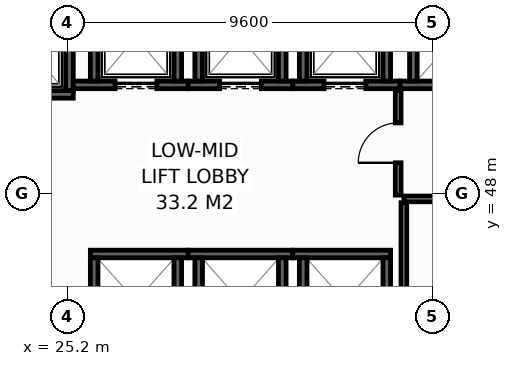
"""IFC4 building model, lengths in metres.
Left out: names, types, materials, properties, quantities, classifications, styles, units other than length and angle.
Written with IfcOpenShell. Run it as: python <this file> out.ifc"""

import sys

from ifc_helpers import new_model, si_unit, direction, frame, frame_2d, origin, place, context, subcontext, project, spatial, rectangle, extrude, element, fill, save


model = new_model("IFC4")
c1 = context("Model", 3, precision=1e-05, world=origin(), true_north=direction((0.0, 1.0)))
c2 = subcontext(c1, "Body", "Model", "MODEL_VIEW")
j1 = project(units=[si_unit("LENGTHUNIT", "METRE"), si_unit("PLANEANGLEUNIT", "RADIAN")], contexts=[c1])
p1 = place(None, origin())
s1 = spatial("IfcSite", under=j1, at=p1, CompositionType="ELEMENT")
p2 = place(p1, origin())
s2 = spatial("IfcBuilding", under=s1, at=p2, CompositionType="ELEMENT")
p3 = place(p2, frame((0.0, 0.0, 51.6)))
s3 = spatial("IfcBuildingStorey", under=s2, at=p3, CompositionType="ELEMENT", Elevation=51.6)
p4 = place(p3, frame((22.5, 50.6, 0.0), z_axis=(0.0, 0.0, 1.0), x_axis=(1.0, 0.0, 0.0)))
e1 = element("IfcWall", 1, at=p4, inside=s3, PredefinedType="SHEAR", context=c2, shape_type="SweptSolid", body=[
    extrude(rectangle(XDim=2.85, YDim=0.2, at=frame_2d((1.425, 0.0))), origin(), (0.0, 0.0, 1.0), 4.15),
])
p5 = place(p4, frame((0.925, 0.0, 0.0)))
e2 = element("IfcOpeningElement", 2, at=p5, cuts=e1, PredefinedType="OPENING", context=c2, shape_type="SweptSolid", body=[
    extrude(rectangle(XDim=1.25, YDim=2.3, at=frame_2d((0.625, 1.15))), frame((0.0, 0.11, 0.0), z_axis=(0.0, -1.0, 0.0), x_axis=(1.0, 0.0, 0.0)), (0.0, 0.0, 1.0), 0.22),
])
p6 = place(p3, frame((25.25, 50.7, 0.0), z_axis=(0.0, 0.0, 1.0), x_axis=(0.0, 1.0, 0.0)))
e3 = element("IfcWall", 3, at=p6, inside=s3, PredefinedType="SHEAR", context=c2, shape_type="SweptSolid", body=[
    extrude(rectangle(XDim=2.6, YDim=0.2, at=frame_2d((1.3, 0.0))), origin(), (0.0, 0.0, 1.0), 4.15),
])
p7 = place(p3, frame((25.35, 50.85, 0.0), z_axis=(0.0, 0.0, 1.0), x_axis=(1.0, 0.0, 0.0)))
e4 = element("IfcWall", 4, at=p7, inside=s3, PredefinedType="SHEAR", context=c2, shape_type="SweptSolid", body=[
    extrude(rectangle(XDim=3.025, YDim=0.2, at=frame_2d((1.512, 0.0))), origin(), (0.0, 0.0, 1.0), 4.15),
])
p8 = place(p7, frame((1.1, 0.0, 0.0)))
e5 = element("IfcOpeningElement", 5, at=p8, cuts=e4, PredefinedType="OPENING", context=c2, shape_type="SweptSolid", body=[
    extrude(rectangle(XDim=1.1, YDim=2.2, at=frame_2d((0.55, 1.1))), frame((0.0, 0.11, 0.0), z_axis=(0.0, -1.0, 0.0), x_axis=(1.0, 0.0, 0.0)), (0.0, 0.0, 1.0), 0.22),
])
for number, where, z_axis, x_axis in (
    (6, (25.9, 50.95, 0.0), (0.0, 0.0, 1.0), (0.0, 1.0, 0.0)),
    (7, (28.1, 50.95, 0.0), (0.0, 0.0, 1.0), (0.0, 1.0, 0.0)),
):
    element("IfcWall", number, at=place(p3, frame(where, z_axis=z_axis, x_axis=x_axis)), inside=s3, PredefinedType="SHEAR", context=c2, shape_type="SweptSolid", body=[
        extrude(rectangle(XDim=2.3, YDim=0.2, at=frame_2d((1.15, 0.0))), origin(), (0.0, 0.0, 1.0), 4.15),
    ])
p9 = place(p3, frame((28.375, 50.85, 0.0), z_axis=(0.0, 0.0, 1.0), x_axis=(1.0, 0.0, 0.0)))
e8 = element("IfcWall", 8, at=p9, inside=s3, PredefinedType="SHEAR", context=c2, shape_type="SweptSolid", body=[
    extrude(rectangle(XDim=2.75, YDim=0.2, at=frame_2d((1.375, 0.0))), origin(), (0.0, 0.0, 1.0), 4.15),
])
p10 = place(p9, frame((0.825, 0.0, 0.0)))
e9 = element("IfcOpeningElement", 9, at=p10, cuts=e8, PredefinedType="OPENING", context=c2, shape_type="SweptSolid", body=[
    extrude(rectangle(XDim=1.1, YDim=2.2, at=frame_2d((0.55, 1.1))), frame((0.0, 0.11, 0.0), z_axis=(0.0, -1.0, 0.0), x_axis=(1.0, 0.0, 0.0)), (0.0, 0.0, 1.0), 0.22),
])
for number, where, z_axis, x_axis in (
    (10, (28.65, 50.95, 0.0), (0.0, 0.0, 1.0), (0.0, 1.0, 0.0)),
    (11, (30.85, 50.95, 0.0), (0.0, 0.0, 1.0), (0.0, 1.0, 0.0)),
):
    element("IfcWall", number, at=place(p3, frame(where, z_axis=z_axis, x_axis=x_axis)), inside=s3, PredefinedType="SHEAR", context=c2, shape_type="SweptSolid", body=[
        extrude(rectangle(XDim=2.3, YDim=0.2, at=frame_2d((1.15, 0.0))), origin(), (0.0, 0.0, 1.0), 4.15),
    ])
p11 = place(p3, frame((31.125, 50.85, 0.0), z_axis=(0.0, 0.0, 1.0), x_axis=(1.0, 0.0, 0.0)))
e12 = element("IfcWall", 12, at=p11, inside=s3, PredefinedType="SHEAR", context=c2, shape_type="SweptSolid", body=[
    extrude(rectangle(XDim=2.825, YDim=0.2, at=frame_2d((1.413, 0.0))), origin(), (0.0, 0.0, 1.0), 4.15),
])
p12 = place(p11, frame((0.825, 0.0, 0.0)))
e13 = element("IfcOpeningElement", 13, at=p12, cuts=e12, PredefinedType="OPENING", context=c2, shape_type="SweptSolid", body=[
    extrude(rectangle(XDim=1.1, YDim=2.2, at=frame_2d((0.55, 1.1))), frame((0.0, 0.11, 0.0), z_axis=(0.0, -1.0, 0.0), x_axis=(1.0, 0.0, 0.0)), (0.0, 0.0, 1.0), 0.22),
])
for number, where, z_axis, x_axis in (
    (14, (31.4, 50.95, 0.0), (0.0, 0.0, 1.0), (0.0, 1.0, 0.0)),
    (15, (33.6, 50.95, 0.0), (0.0, 0.0, 1.0), (0.0, 1.0, 0.0)),
):
    element("IfcWall", number, at=place(p3, frame(where, z_axis=z_axis, x_axis=x_axis)), inside=s3, PredefinedType="SHEAR", context=c2, shape_type="SweptSolid", body=[
        extrude(rectangle(XDim=2.3, YDim=0.2, at=frame_2d((1.15, 0.0))), origin(), (0.0, 0.0, 1.0), 4.15),
    ])
p13 = place(p3, frame((25.8, 46.4, 0.0), z_axis=(0.0, 0.0, 1.0), x_axis=(1.0, 0.0, 0.0)))
e16 = element("IfcWall", 16, at=p13, inside=s3, PredefinedType="SHEAR", context=c2, shape_type="SweptSolid", body=[
    extrude(rectangle(XDim=2.575, YDim=0.2, at=frame_2d((1.288, 0.0))), origin(), (0.0, 0.0, 1.0), 4.15),
])
for number, where, z_axis, x_axis in (
    (17, (25.9, 44.0, 0.0), (0.0, 0.0, 1.0), (0.0, 1.0, 0.0)),
    (18, (28.1, 44.0, 0.0), (0.0, 0.0, 1.0), (0.0, 1.0, 0.0)),
):
    element("IfcWall", number, at=place(p3, frame(where, z_axis=z_axis, x_axis=x_axis)), inside=s3, PredefinedType="SHEAR", context=c2, shape_type="SweptSolid", body=[
        extrude(rectangle(XDim=2.3, YDim=0.2, at=frame_2d((1.15, 0.0))), origin(), (0.0, 0.0, 1.0), 4.15),
    ])
p14 = place(p3, frame((28.375, 46.4, 0.0), z_axis=(0.0, 0.0, 1.0), x_axis=(1.0, 0.0, 0.0)))
e19 = element("IfcWall", 19, at=p14, inside=s3, PredefinedType="SHEAR", context=c2, shape_type="SweptSolid", body=[
    extrude(rectangle(XDim=2.75, YDim=0.2, at=frame_2d((1.375, 0.0))), origin(), (0.0, 0.0, 1.0), 4.15),
])
for number, where, z_axis, x_axis in (
    (20, (28.65, 44.0, 0.0), (0.0, 0.0, 1.0), (0.0, 1.0, 0.0)),
    (21, (30.85, 44.0, 0.0), (0.0, 0.0, 1.0), (0.0, 1.0, 0.0)),
):
    element("IfcWall", number, at=place(p3, frame(where, z_axis=z_axis, x_axis=x_axis)), inside=s3, PredefinedType="SHEAR", context=c2, shape_type="SweptSolid", body=[
        extrude(rectangle(XDim=2.3, YDim=0.2, at=frame_2d((1.15, 0.0))), origin(), (0.0, 0.0, 1.0), 4.15),
    ])
p15 = place(p3, frame((31.125, 46.4, 0.0), z_axis=(0.0, 0.0, 1.0), x_axis=(1.0, 0.0, 0.0)))
e22 = element("IfcWall", 22, at=p15, inside=s3, PredefinedType="SHEAR", context=c2, shape_type="SweptSolid", body=[
    extrude(rectangle(XDim=2.575, YDim=0.2, at=frame_2d((1.288, 0.0))), origin(), (0.0, 0.0, 1.0), 4.15),
])
for number, where, z_axis, x_axis in (
    (23, (31.4, 44.0, 0.0), (0.0, 0.0, 1.0), (0.0, 1.0, 0.0)),
    (24, (33.6, 44.0, 0.0), (0.0, 0.0, 1.0), (0.0, 1.0, 0.0)),
):
    element("IfcWall", number, at=place(p3, frame(where, z_axis=z_axis, x_axis=x_axis)), inside=s3, PredefinedType="SHEAR", context=c2, shape_type="SweptSolid", body=[
        extrude(rectangle(XDim=2.3, YDim=0.2, at=frame_2d((1.15, 0.0))), origin(), (0.0, 0.0, 1.0), 4.15),
    ])
p16 = place(p3, frame((33.95, 50.85, 0.0), z_axis=(0.0, 0.0, 1.0), x_axis=(1.0, 0.0, 0.0)))
e25 = element("IfcWall", 25, at=p16, inside=s3, PredefinedType="SHEAR", context=c2, shape_type="SweptSolid", body=[
    extrude(rectangle(XDim=2.825, YDim=0.2, at=frame_2d((1.413, 0.0))), origin(), (0.0, 0.0, 1.0), 4.15),
])
p17 = place(p3, frame((34.3, 50.95, 0.0), z_axis=(0.0, 0.0, 1.0), x_axis=(0.0, 1.0, 0.0)))
e26 = element("IfcWall", 26, at=p17, inside=s3, PredefinedType="SHEAR", context=c2, shape_type="SweptSolid", body=[
    extrude(rectangle(XDim=2.3, YDim=0.2, at=frame_2d((1.15, 0.0))), origin(), (0.0, 0.0, 1.0), 4.15),
])
p18 = place(p3, frame((33.9, 47.95, 0.0), z_axis=(0.0, 0.0, 1.0), x_axis=(0.0, 1.0, 0.0)))
e27 = element("IfcWall", 27, at=p18, inside=s3, PredefinedType="PARTITIONING", context=c2, shape_type="SweptSolid", body=[
    extrude(rectangle(XDim=2.75, YDim=0.15, at=frame_2d((1.375, 0.0))), origin(), (0.0, 0.0, 1.0), 4.15),
])
p19 = place(p18, frame((0.85, 0.0, 0.0)))
e28 = element("IfcOpeningElement", 28, at=p19, cuts=e27, PredefinedType="OPENING", context=c2, shape_type="SweptSolid", body=[
    extrude(rectangle(XDim=1.05, YDim=2.15, at=frame_2d((0.525, 1.075))), frame((0.0, 0.085, 0.0), z_axis=(0.0, -1.0, 0.0), x_axis=(1.0, 0.0, 0.0)), (0.0, 0.0, 1.0), 0.17),
])
p20 = place(p3, frame((34.05, 47.85, 0.0), z_axis=(0.0, 0.0, 1.0), x_axis=(1.0, 0.0, 0.0)))
e29 = element("IfcWall", 29, at=p20, inside=s3, PredefinedType="PARTITIONING", context=c2, shape_type="SweptSolid", body=[
    extrude(rectangle(XDim=8.45, YDim=0.15, at=frame_2d((4.225, 0.0))), origin(), (0.0, 0.0, 1.0), 4.15),
])
p21 = place(p3, frame((34.05, 45.22, 0.0), z_axis=(0.0, 0.0, 1.0), x_axis=(0.0, 1.0, 0.0)))
e30 = element("IfcWall", 30, at=p21, inside=s3, PredefinedType="PARTITIONING", context=c2, shape_type="SweptSolid", body=[
    extrude(rectangle(XDim=2.53, YDim=0.15, at=frame_2d((1.265, 0.0))), origin(), (0.0, 0.0, 1.0), 4.15),
])
p22 = place(p8, origin())
e31 = element("IfcDoor", 31, at=p22, inside=s3, OperationType="SLIDING_TO_LEFT", PredefinedType="DOOR", context=c2, shape_type="SweptSolid", body=[
    extrude(rectangle(XDim=1.1, YDim=2.2, at=frame_2d((0.55, 1.1))), frame((0.0, 0.025, 0.0), z_axis=(0.0, -1.0, 0.0), x_axis=(1.0, 0.0, 0.0)), (0.0, 0.0, 1.0), 0.05),
])
fill(e5, e31)
p23 = place(p10, origin())
e32 = element("IfcDoor", 32, at=p23, inside=s3, OperationType="SLIDING_TO_LEFT", PredefinedType="DOOR", context=c2, shape_type="SweptSolid", body=[
    extrude(rectangle(XDim=1.1, YDim=2.2, at=frame_2d((0.55, 1.1))), frame((0.0, 0.025, 0.0), z_axis=(0.0, -1.0, 0.0), x_axis=(1.0, 0.0, 0.0)), (0.0, 0.0, 1.0), 0.05),
])
fill(e9, e32)
p24 = place(p12, origin())
e33 = element("IfcDoor", 33, at=p24, inside=s3, OperationType="SLIDING_TO_LEFT", PredefinedType="DOOR", context=c2, shape_type="SweptSolid", body=[
    extrude(rectangle(XDim=1.1, YDim=2.2, at=frame_2d((0.55, 1.1))), frame((0.0, 0.025, 0.0), z_axis=(0.0, -1.0, 0.0), x_axis=(1.0, 0.0, 0.0)), (0.0, 0.0, 1.0), 0.05),
])
fill(e13, e33)
p25 = place(p19, origin())
e34 = element("IfcDoor", 34, at=p25, inside=s3, OperationType="SINGLE_SWING_LEFT", PredefinedType="DOOR", context=c2, shape_type="SweptSolid", body=[
    extrude(rectangle(XDim=1.05, YDim=2.15, at=frame_2d((0.525, 1.075))), frame((0.0, 0.025, 0.0), z_axis=(0.0, -1.0, 0.0), x_axis=(1.0, 0.0, 0.0)), (0.0, 0.0, 1.0), 0.05),
])
fill(e28, e34)
save(model, sys.argv[1])
